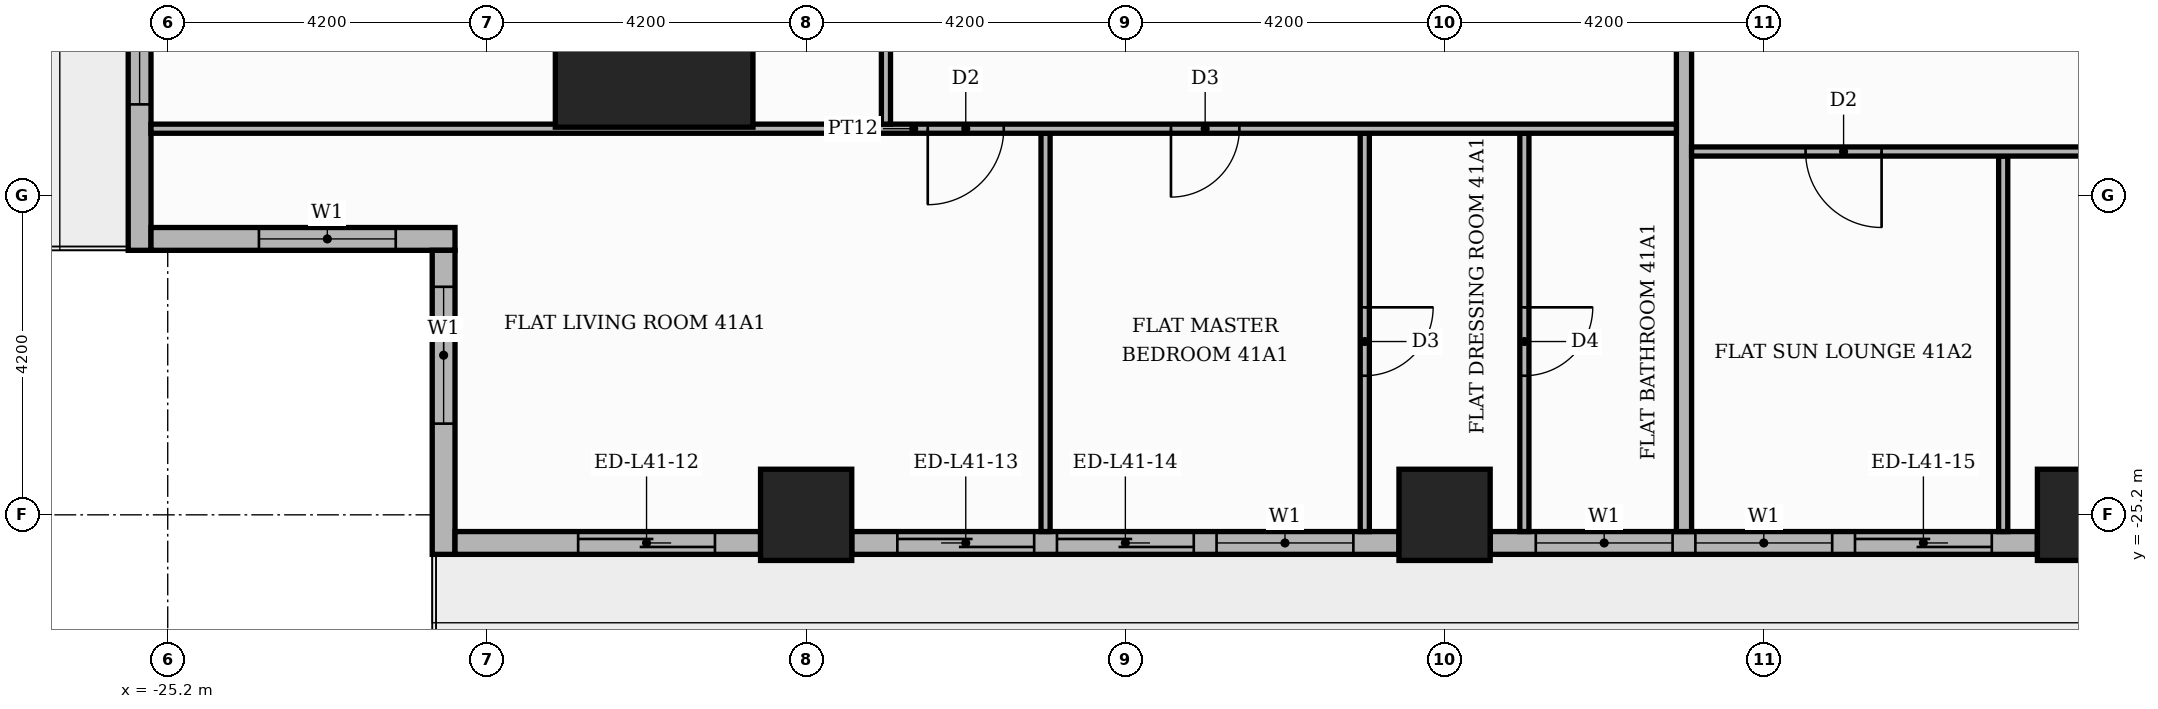
"""IFC4 building model, lengths in metres.
Left out: names, types, materials, properties, quantities, classifications, styles, units other than length and angle.
Written with IfcOpenShell. Run it as: python <this file> out.ifc"""

import sys

from ifc_helpers import new_model, si_unit, direction, frame, frame_2d, origin, origin_2d, place, context, subcontext, project, spatial, rectangle, extrude, element, fill, save


model = new_model("IFC4")
c1 = context("Model", 3, precision=1e-05, world=origin(), true_north=direction((0.0, 1.0)))
c2 = subcontext(c1, "Body", "Model", "MODEL_VIEW")
j1 = project(units=[si_unit("LENGTHUNIT", "METRE"), si_unit("PLANEANGLEUNIT", "RADIAN")], contexts=[c1])
p1 = place(None, origin())
s1 = spatial("IfcSite", under=j1, at=p1, CompositionType="ELEMENT")
p2 = place(p1, origin())
s2 = spatial("IfcBuilding", under=s1, at=p2, CompositionType="ELEMENT")
p3 = place(p2, frame((0.0, 0.0, 172.8)))
s3 = spatial("IfcBuildingStorey", under=s2, at=p3, CompositionType="ELEMENT", Elevation=172.8)
p4 = place(p3, frame((-18.8, -18.8, 0.0), z_axis=(0.0, 0.0, 1.0), x_axis=(1.0, 0.0, 0.0)))
e1 = element("IfcColumn", 1, at=p4, inside=s3, PredefinedType="COLUMN", context=c2, shape_type="SweptSolid", body=[
    extrude(rectangle(XDim=2.6, YDim=2.6, at=origin_2d()), origin(), (0.0, 0.0, 1.0), 3.9),
])
for number, where, z_axis, x_axis in (
    (2, (0.0, -25.2, 0.0), (0.0, 0.0, 1.0), (1.0, 0.0, 0.0)),
    (3, (-8.4, -25.2, 0.0), (0.0, 0.0, 1.0), (1.0, 0.0, 0.0)),
    (4, (-16.8, -25.2, 0.0), (0.0, 0.0, 1.0), (1.0, 0.0, 0.0)),
):
    element("IfcColumn", number, at=place(p3, frame(where, z_axis=z_axis, x_axis=x_axis)), inside=s3, PredefinedType="COLUMN", context=c2, shape_type="SweptSolid", body=[
        extrude(rectangle(XDim=1.2, YDim=1.2, at=origin_2d()), origin(), (0.0, 0.0, 1.0), 3.9),
    ])
p5 = place(p3, frame((-25.57, -17.4, 0.0), z_axis=(0.0, 0.0, 1.0), x_axis=(0.0, -1.0, 0.0)))
e5 = element("IfcWall", 5, at=p5, inside=s3, PredefinedType="STANDARD", context=c2, shape_type="SweptSolid", body=[
    extrude(rectangle(XDim=4.32, YDim=0.3, at=frame_2d((2.16, 0.0))), origin(), (0.0, 0.0, 1.0), 3.48),
])
p6 = place(p5, frame((0.6, 0.0, 0.9)))
e6 = element("IfcOpeningElement", 6, at=p6, cuts=e5, PredefinedType="OPENING", context=c2, shape_type="SweptSolid", body=[
    extrude(rectangle(XDim=1.8, YDim=2.1, at=frame_2d((0.9, 1.05))), frame((0.0, 0.16, 0.0), z_axis=(0.0, -1.0, 0.0), x_axis=(1.0, 0.0, 0.0)), (0.0, 0.0, 1.0), 0.32),
])
p7 = place(p3, frame((-25.42, -21.57, 0.0), z_axis=(0.0, 0.0, 1.0), x_axis=(1.0, 0.0, 0.0)))
e7 = element("IfcWall", 7, at=p7, inside=s3, PredefinedType="STANDARD", context=c2, shape_type="SweptSolid", body=[
    extrude(rectangle(XDim=4.0, YDim=0.3, at=frame_2d((2.0, 0.0))), origin(), (0.0, 0.0, 1.0), 3.48),
])
p8 = place(p7, frame((1.42, 0.0, 0.9)))
e8 = element("IfcOpeningElement", 8, at=p8, cuts=e7, PredefinedType="OPENING", context=c2, shape_type="SweptSolid", body=[
    extrude(rectangle(XDim=1.8, YDim=2.1, at=frame_2d((0.9, 1.05))), frame((0.0, 0.16, 0.0), z_axis=(0.0, -1.0, 0.0), x_axis=(1.0, 0.0, 0.0)), (0.0, 0.0, 1.0), 0.32),
])
p9 = place(p3, frame((-21.57, -21.72, 0.0), z_axis=(0.0, 0.0, 1.0), x_axis=(0.0, -1.0, 0.0)))
e9 = element("IfcWall", 9, at=p9, inside=s3, PredefinedType="STANDARD", context=c2, shape_type="SweptSolid", body=[
    extrude(rectangle(XDim=4.0, YDim=0.3, at=frame_2d((2.0, 0.0))), origin(), (0.0, 0.0, 1.0), 3.48),
])
p10 = place(p9, frame((0.48, 0.0, 0.9)))
e10 = element("IfcOpeningElement", 10, at=p10, cuts=e9, PredefinedType="OPENING", context=c2, shape_type="SweptSolid", body=[
    extrude(rectangle(XDim=1.8, YDim=2.1, at=frame_2d((0.9, 1.05))), frame((0.0, 0.16, 0.0), z_axis=(0.0, -1.0, 0.0), x_axis=(1.0, 0.0, 0.0)), (0.0, 0.0, 1.0), 0.32),
])
p11 = place(p3, frame((-21.42, -25.57, 0.0), z_axis=(0.0, 0.0, 1.0), x_axis=(1.0, 0.0, 0.0)))
e11 = element("IfcWall", 11, at=p11, inside=s3, PredefinedType="STANDARD", context=c2, shape_type="SweptSolid", body=[
    extrude(rectangle(XDim=4.02, YDim=0.3, at=frame_2d((2.01, 0.0))), origin(), (0.0, 0.0, 1.0), 3.48),
])
p12 = place(p11, frame((1.62, 0.0, 0.0)))
e12 = element("IfcOpeningElement", 12, at=p12, cuts=e11, PredefinedType="OPENING", context=c2, shape_type="SweptSolid", body=[
    extrude(rectangle(XDim=1.8, YDim=2.4, at=frame_2d((0.9, 1.2))), frame((0.0, 0.16, 0.0), z_axis=(0.0, -1.0, 0.0), x_axis=(1.0, 0.0, 0.0)), (0.0, 0.0, 1.0), 0.32),
])
p13 = place(p3, frame((-16.2, -25.57, 0.0), z_axis=(0.0, 0.0, 1.0), x_axis=(1.0, 0.0, 0.0)))
e13 = element("IfcWall", 13, at=p13, inside=s3, PredefinedType="STANDARD", context=c2, shape_type="SweptSolid", body=[
    extrude(rectangle(XDim=7.2, YDim=0.3, at=frame_2d((3.6, 0.0))), origin(), (0.0, 0.0, 1.0), 3.48),
])
p14 = place(p13, frame((0.6, 0.0, 0.0)))
e14 = element("IfcOpeningElement", 14, at=p14, cuts=e13, PredefinedType="OPENING", context=c2, shape_type="SweptSolid", body=[
    extrude(rectangle(XDim=1.8, YDim=2.4, at=frame_2d((0.9, 1.2))), frame((0.0, 0.16, 0.0), z_axis=(0.0, -1.0, 0.0), x_axis=(1.0, 0.0, 0.0)), (0.0, 0.0, 1.0), 0.32),
])
p15 = place(p13, frame((2.7, 0.0, 0.0)))
e15 = element("IfcOpeningElement", 15, at=p15, cuts=e13, PredefinedType="OPENING", context=c2, shape_type="SweptSolid", body=[
    extrude(rectangle(XDim=1.8, YDim=2.4, at=frame_2d((0.9, 1.2))), frame((0.0, 0.16, 0.0), z_axis=(0.0, -1.0, 0.0), x_axis=(1.0, 0.0, 0.0)), (0.0, 0.0, 1.0), 0.32),
])
p16 = place(p13, frame((4.8, 0.0, 0.9)))
e16 = element("IfcOpeningElement", 16, at=p16, cuts=e13, PredefinedType="OPENING", context=c2, shape_type="SweptSolid", body=[
    extrude(rectangle(XDim=1.8, YDim=2.1, at=frame_2d((0.9, 1.05))), frame((0.0, 0.16, 0.0), z_axis=(0.0, -1.0, 0.0), x_axis=(1.0, 0.0, 0.0)), (0.0, 0.0, 1.0), 0.32),
])
p17 = place(p3, frame((-7.8, -25.57, 0.0), z_axis=(0.0, 0.0, 1.0), x_axis=(1.0, 0.0, 0.0)))
e17 = element("IfcWall", 17, at=p17, inside=s3, PredefinedType="STANDARD", context=c2, shape_type="SweptSolid", body=[
    extrude(rectangle(XDim=7.2, YDim=0.3, at=frame_2d((3.6, 0.0))), origin(), (0.0, 0.0, 1.0), 3.48),
])
p18 = place(p17, frame((0.6, 0.0, 0.9)))
e18 = element("IfcOpeningElement", 18, at=p18, cuts=e17, PredefinedType="OPENING", context=c2, shape_type="SweptSolid", body=[
    extrude(rectangle(XDim=1.8, YDim=2.1, at=frame_2d((0.9, 1.05))), frame((0.0, 0.16, 0.0), z_axis=(0.0, -1.0, 0.0), x_axis=(1.0, 0.0, 0.0)), (0.0, 0.0, 1.0), 0.32),
])
p19 = place(p17, frame((2.7, 0.0, 0.9)))
e19 = element("IfcOpeningElement", 19, at=p19, cuts=e17, PredefinedType="OPENING", context=c2, shape_type="SweptSolid", body=[
    extrude(rectangle(XDim=1.8, YDim=2.1, at=frame_2d((0.9, 1.05))), frame((0.0, 0.16, 0.0), z_axis=(0.0, -1.0, 0.0), x_axis=(1.0, 0.0, 0.0)), (0.0, 0.0, 1.0), 0.32),
])
p20 = place(p17, frame((4.8, 0.0, 0.0)))
e20 = element("IfcOpeningElement", 20, at=p20, cuts=e17, PredefinedType="OPENING", context=c2, shape_type="SweptSolid", body=[
    extrude(rectangle(XDim=1.8, YDim=2.4, at=frame_2d((0.9, 1.2))), frame((0.0, 0.16, 0.0), z_axis=(0.0, -1.0, 0.0), x_axis=(1.0, 0.0, 0.0)), (0.0, 0.0, 1.0), 0.32),
])
p21 = place(p3, frame((-13.65, -25.42, 0.0), z_axis=(0.0, 0.0, 1.0), x_axis=(0.0, 1.0, 0.0)))
e21 = element("IfcWall", 21, at=p21, inside=s3, PredefinedType="PARTITIONING", context=c2, shape_type="SweptSolid", body=[
    extrude(rectangle(XDim=5.24, YDim=0.12, at=frame_2d((2.62, 0.0))), origin(), (0.0, 0.0, 1.0), 3.48),
])
p22 = place(p3, frame((-9.45, -25.42, 0.0), z_axis=(0.0, 0.0, 1.0), x_axis=(0.0, 1.0, 0.0)))
e22 = element("IfcWall", 22, at=p22, inside=s3, PredefinedType="PARTITIONING", context=c2, shape_type="SweptSolid", body=[
    extrude(rectangle(XDim=5.24, YDim=0.12, at=frame_2d((2.62, 0.0))), origin(), (0.0, 0.0, 1.0), 3.48),
])
p23 = place(p22, frame((2.05, 0.0, 0.0)))
e23 = element("IfcOpeningElement", 23, at=p23, cuts=e22, PredefinedType="OPENING", context=c2, shape_type="SweptSolid", body=[
    extrude(rectangle(XDim=0.9, YDim=2.1, at=frame_2d((0.45, 1.05))), frame((0.0, 0.07, 0.0), z_axis=(0.0, -1.0, 0.0), x_axis=(1.0, 0.0, 0.0)), (0.0, 0.0, 1.0), 0.14),
])
p24 = place(p3, frame((-7.35, -25.42, 0.0), z_axis=(0.0, 0.0, 1.0), x_axis=(0.0, 1.0, 0.0)))
e24 = element("IfcWall", 24, at=p24, inside=s3, PredefinedType="PARTITIONING", context=c2, shape_type="SweptSolid", body=[
    extrude(rectangle(XDim=5.24, YDim=0.12, at=frame_2d((2.62, 0.0))), origin(), (0.0, 0.0, 1.0), 3.48),
])
p25 = place(p24, frame((2.05, 0.0, 0.0)))
e25 = element("IfcOpeningElement", 25, at=p25, cuts=e24, PredefinedType="OPENING", context=c2, shape_type="SweptSolid", body=[
    extrude(rectangle(XDim=0.9, YDim=2.1, at=frame_2d((0.45, 1.05))), frame((0.0, 0.07, 0.0), z_axis=(0.0, -1.0, 0.0), x_axis=(1.0, 0.0, 0.0)), (0.0, 0.0, 1.0), 0.14),
])
p26 = place(p3, frame((-5.25, -25.42, 0.0), z_axis=(0.0, 0.0, 1.0), x_axis=(0.0, 1.0, 0.0)))
e26 = element("IfcWall", 26, at=p26, inside=s3, PredefinedType="PARTITIONING", context=c2, shape_type="SweptSolid", body=[
    extrude(rectangle(XDim=11.67, YDim=0.2, at=frame_2d((5.835, 0.0))), origin(), (0.0, 0.0, 1.0), 3.48),
])
p27 = place(p3, frame((-1.05, -25.42, 0.0), z_axis=(0.0, 0.0, 1.0), x_axis=(0.0, 1.0, 0.0)))
e27 = element("IfcWall", 27, at=p27, inside=s3, PredefinedType="PARTITIONING", context=c2, shape_type="SweptSolid", body=[
    extrude(rectangle(XDim=4.94, YDim=0.12, at=frame_2d((2.47, 0.0))), origin(), (0.0, 0.0, 1.0), 3.48),
])
p28 = place(p3, frame((-5.15, -20.42, 0.0), z_axis=(0.0, 0.0, 1.0), x_axis=(1.0, 0.0, 0.0)))
e28 = element("IfcWall", 28, at=p28, inside=s3, PredefinedType="PARTITIONING", context=c2, shape_type="SweptSolid", body=[
    extrude(rectangle(XDim=18.7, YDim=0.12, at=frame_2d((9.35, 0.0))), origin(), (0.0, 0.0, 1.0), 3.48),
])
p29 = place(p28, frame((1.5, 0.0, 0.0)))
e29 = element("IfcOpeningElement", 29, at=p29, cuts=e28, PredefinedType="OPENING", context=c2, shape_type="SweptSolid", body=[
    extrude(rectangle(XDim=1.0, YDim=2.1, at=frame_2d((0.5, 1.05))), frame((0.0, 0.07, 0.0), z_axis=(0.0, -1.0, 0.0), x_axis=(1.0, 0.0, 0.0)), (0.0, 0.0, 1.0), 0.14),
])
p30 = place(p28, frame((5.75, 0.0, 0.0)))
e30 = element("IfcOpeningElement", 30, at=p30, cuts=e28, PredefinedType="OPENING", context=c2, shape_type="SweptSolid", body=[
    extrude(rectangle(XDim=0.9, YDim=2.1, at=frame_2d((0.45, 1.05))), frame((0.0, 0.07, 0.0), z_axis=(0.0, -1.0, 0.0), x_axis=(1.0, 0.0, 0.0)), (0.0, 0.0, 1.0), 0.14),
])
p31 = place(p28, frame((14.15, 0.0, 0.0)))
e31 = element("IfcOpeningElement", 31, at=p31, cuts=e28, PredefinedType="OPENING", context=c2, shape_type="SweptSolid", body=[
    extrude(rectangle(XDim=0.9, YDim=2.1, at=frame_2d((0.45, 1.05))), frame((0.0, 0.07, 0.0), z_axis=(0.0, -1.0, 0.0), x_axis=(1.0, 0.0, 0.0)), (0.0, 0.0, 1.0), 0.14),
])
p32 = place(p3, frame((-25.42, -20.12, 0.0), z_axis=(0.0, 0.0, 1.0), x_axis=(1.0, 0.0, 0.0)))
e32 = element("IfcWall", 32, at=p32, inside=s3, PredefinedType="PARTITIONING", context=c2, shape_type="SweptSolid", body=[
    extrude(rectangle(XDim=20.07, YDim=0.12, at=frame_2d((10.035, 0.0))), origin(), (0.0, 0.0, 1.0), 3.48),
])
p33 = place(p32, frame((10.22, 0.0, 0.0)))
e33 = element("IfcOpeningElement", 33, at=p33, cuts=e32, PredefinedType="OPENING", context=c2, shape_type="SweptSolid", body=[
    extrude(rectangle(XDim=1.0, YDim=2.1, at=frame_2d((0.5, 1.05))), frame((0.0, 0.07, 0.0), z_axis=(0.0, -1.0, 0.0), x_axis=(1.0, 0.0, 0.0)), (0.0, 0.0, 1.0), 0.14),
])
p34 = place(p32, frame((13.42, 0.0, 0.0)))
e34 = element("IfcOpeningElement", 34, at=p34, cuts=e32, PredefinedType="OPENING", context=c2, shape_type="SweptSolid", body=[
    extrude(rectangle(XDim=0.9, YDim=2.1, at=frame_2d((0.45, 1.05))), frame((0.0, 0.07, 0.0), z_axis=(0.0, -1.0, 0.0), x_axis=(1.0, 0.0, 0.0)), (0.0, 0.0, 1.0), 0.14),
])
p35 = place(p3, frame((-15.75, -20.06, 0.0), z_axis=(0.0, 0.0, 1.0), x_axis=(0.0, 1.0, 0.0)))
e35 = element("IfcWall", 35, at=p35, inside=s3, PredefinedType="PARTITIONING", context=c2, shape_type="SweptSolid", body=[
    extrude(rectangle(XDim=6.31, YDim=0.12, at=frame_2d((3.155, 0.0))), origin(), (0.0, 0.0, 1.0), 3.48),
])
p36 = place(p35, frame((2.675, 0.0, 0.0)))
e36 = element("IfcOpeningElement", 36, at=p36, cuts=e35, PredefinedType="OPENING", context=c2, shape_type="SweptSolid", body=[
    extrude(rectangle(XDim=1.0, YDim=2.1, at=frame_2d((0.5, 1.05))), frame((0.0, 0.07, 0.0), z_axis=(0.0, -1.0, 0.0), x_axis=(1.0, 0.0, 0.0)), (0.0, 0.0, 1.0), 0.14),
])
p37 = place(p6, origin())
e37 = element("IfcWindow", 37, at=p37, inside=s3, PartitioningType="SINGLE_PANEL", PredefinedType="WINDOW", context=c2, shape_type="SweptSolid", body=[
    extrude(rectangle(XDim=1.8, YDim=2.1, at=frame_2d((0.9, 1.05))), frame((0.0, 0.03, 0.0), z_axis=(0.0, -1.0, 0.0), x_axis=(1.0, 0.0, 0.0)), (0.0, 0.0, 1.0), 0.06),
])
fill(e6, e37)
p38 = place(p8, origin())
e38 = element("IfcWindow", 38, at=p38, inside=s3, PartitioningType="SINGLE_PANEL", PredefinedType="WINDOW", context=c2, shape_type="SweptSolid", body=[
    extrude(rectangle(XDim=1.8, YDim=2.1, at=frame_2d((0.9, 1.05))), frame((0.0, 0.03, 0.0), z_axis=(0.0, -1.0, 0.0), x_axis=(1.0, 0.0, 0.0)), (0.0, 0.0, 1.0), 0.06),
])
fill(e8, e38)
p39 = place(p10, origin())
e39 = element("IfcWindow", 39, at=p39, inside=s3, PartitioningType="SINGLE_PANEL", PredefinedType="WINDOW", context=c2, shape_type="SweptSolid", body=[
    extrude(rectangle(XDim=1.8, YDim=2.1, at=frame_2d((0.9, 1.05))), frame((0.0, 0.03, 0.0), z_axis=(0.0, -1.0, 0.0), x_axis=(1.0, 0.0, 0.0)), (0.0, 0.0, 1.0), 0.06),
])
fill(e10, e39)
p40 = place(p12, origin())
e40 = element("IfcDoor", 40, at=p40, inside=s3, OperationType="SLIDING_TO_RIGHT", PredefinedType="DOOR", context=c2, shape_type="SweptSolid", body=[
    extrude(rectangle(XDim=1.8, YDim=2.4, at=frame_2d((0.9, 1.2))), frame((0.0, 0.025, 0.0), z_axis=(0.0, -1.0, 0.0), x_axis=(1.0, 0.0, 0.0)), (0.0, 0.0, 1.0), 0.05),
])
fill(e12, e40)
p41 = place(p14, origin())
e41 = element("IfcDoor", 41, at=p41, inside=s3, OperationType="SLIDING_TO_LEFT", PredefinedType="DOOR", context=c2, shape_type="SweptSolid", body=[
    extrude(rectangle(XDim=1.8, YDim=2.4, at=frame_2d((0.9, 1.2))), frame((0.0, 0.025, 0.0), z_axis=(0.0, -1.0, 0.0), x_axis=(1.0, 0.0, 0.0)), (0.0, 0.0, 1.0), 0.05),
])
fill(e14, e41)
p42 = place(p15, origin())
e42 = element("IfcDoor", 42, at=p42, inside=s3, OperationType="SLIDING_TO_RIGHT", PredefinedType="DOOR", context=c2, shape_type="SweptSolid", body=[
    extrude(rectangle(XDim=1.8, YDim=2.4, at=frame_2d((0.9, 1.2))), frame((0.0, 0.025, 0.0), z_axis=(0.0, -1.0, 0.0), x_axis=(1.0, 0.0, 0.0)), (0.0, 0.0, 1.0), 0.05),
])
fill(e15, e42)
p43 = place(p16, origin())
e43 = element("IfcWindow", 43, at=p43, inside=s3, PartitioningType="SINGLE_PANEL", PredefinedType="WINDOW", context=c2, shape_type="SweptSolid", body=[
    extrude(rectangle(XDim=1.8, YDim=2.1, at=frame_2d((0.9, 1.05))), frame((0.0, 0.03, 0.0), z_axis=(0.0, -1.0, 0.0), x_axis=(1.0, 0.0, 0.0)), (0.0, 0.0, 1.0), 0.06),
])
fill(e16, e43)
p44 = place(p18, origin())
e44 = element("IfcWindow", 44, at=p44, inside=s3, PartitioningType="SINGLE_PANEL", PredefinedType="WINDOW", context=c2, shape_type="SweptSolid", body=[
    extrude(rectangle(XDim=1.8, YDim=2.1, at=frame_2d((0.9, 1.05))), frame((0.0, 0.03, 0.0), z_axis=(0.0, -1.0, 0.0), x_axis=(1.0, 0.0, 0.0)), (0.0, 0.0, 1.0), 0.06),
])
fill(e18, e44)
p45 = place(p19, origin())
e45 = element("IfcWindow", 45, at=p45, inside=s3, PartitioningType="SINGLE_PANEL", PredefinedType="WINDOW", context=c2, shape_type="SweptSolid", body=[
    extrude(rectangle(XDim=1.8, YDim=2.1, at=frame_2d((0.9, 1.05))), frame((0.0, 0.03, 0.0), z_axis=(0.0, -1.0, 0.0), x_axis=(1.0, 0.0, 0.0)), (0.0, 0.0, 1.0), 0.06),
])
fill(e19, e45)
p46 = place(p20, origin())
e46 = element("IfcDoor", 46, at=p46, inside=s3, OperationType="SLIDING_TO_RIGHT", PredefinedType="DOOR", context=c2, shape_type="SweptSolid", body=[
    extrude(rectangle(XDim=1.8, YDim=2.4, at=frame_2d((0.9, 1.2))), frame((0.0, 0.025, 0.0), z_axis=(0.0, -1.0, 0.0), x_axis=(1.0, 0.0, 0.0)), (0.0, 0.0, 1.0), 0.05),
])
fill(e20, e46)
p47 = place(p33, frame((1.0, 0.0, 0.0), z_axis=(0.0, 0.0, 1.0), x_axis=(-1.0, 0.0, 0.0)))
e47 = element("IfcDoor", 47, at=p47, inside=s3, OperationType="SINGLE_SWING_LEFT", PredefinedType="DOOR", context=c2, shape_type="SweptSolid", body=[
    extrude(rectangle(XDim=1.0, YDim=2.1, at=frame_2d((0.5, 1.05))), frame((0.0, 0.025, 0.0), z_axis=(0.0, -1.0, 0.0), x_axis=(1.0, 0.0, 0.0)), (0.0, 0.0, 1.0), 0.05),
])
fill(e33, e47)
p48 = place(p34, frame((0.9, 0.0, 0.0), z_axis=(0.0, 0.0, 1.0), x_axis=(-1.0, 0.0, 0.0)))
e48 = element("IfcDoor", 48, at=p48, inside=s3, OperationType="SINGLE_SWING_LEFT", PredefinedType="DOOR", context=c2, shape_type="SweptSolid", body=[
    extrude(rectangle(XDim=0.9, YDim=2.1, at=frame_2d((0.45, 1.05))), frame((0.0, 0.025, 0.0), z_axis=(0.0, -1.0, 0.0), x_axis=(1.0, 0.0, 0.0)), (0.0, 0.0, 1.0), 0.05),
])
fill(e34, e48)
p49 = place(p23, frame((0.9, 0.0, 0.0), z_axis=(0.0, 0.0, 1.0), x_axis=(-1.0, 0.0, 0.0)))
e49 = element("IfcDoor", 49, at=p49, inside=s3, OperationType="SINGLE_SWING_RIGHT", PredefinedType="DOOR", context=c2, shape_type="SweptSolid", body=[
    extrude(rectangle(XDim=0.9, YDim=2.1, at=frame_2d((0.45, 1.05))), frame((0.0, 0.025, 0.0), z_axis=(0.0, -1.0, 0.0), x_axis=(1.0, 0.0, 0.0)), (0.0, 0.0, 1.0), 0.05),
])
fill(e23, e49)
p50 = place(p25, frame((0.9, 0.0, 0.0), z_axis=(0.0, 0.0, 1.0), x_axis=(-1.0, 0.0, 0.0)))
e50 = element("IfcDoor", 50, at=p50, inside=s3, OperationType="SINGLE_SWING_RIGHT", PredefinedType="DOOR", context=c2, shape_type="SweptSolid", body=[
    extrude(rectangle(XDim=0.9, YDim=2.1, at=frame_2d((0.45, 1.05))), frame((0.0, 0.025, 0.0), z_axis=(0.0, -1.0, 0.0), x_axis=(1.0, 0.0, 0.0)), (0.0, 0.0, 1.0), 0.05),
])
fill(e25, e50)
p51 = place(p29, frame((1.0, 0.0, 0.0), z_axis=(0.0, 0.0, 1.0), x_axis=(-1.0, 0.0, 0.0)))
e51 = element("IfcDoor", 51, at=p51, inside=s3, OperationType="SINGLE_SWING_RIGHT", PredefinedType="DOOR", context=c2, shape_type="SweptSolid", body=[
    extrude(rectangle(XDim=1.0, YDim=2.1, at=frame_2d((0.5, 1.05))), frame((0.0, 0.025, 0.0), z_axis=(0.0, -1.0, 0.0), x_axis=(1.0, 0.0, 0.0)), (0.0, 0.0, 1.0), 0.05),
])
fill(e29, e51)
save(model, sys.argv[1])
